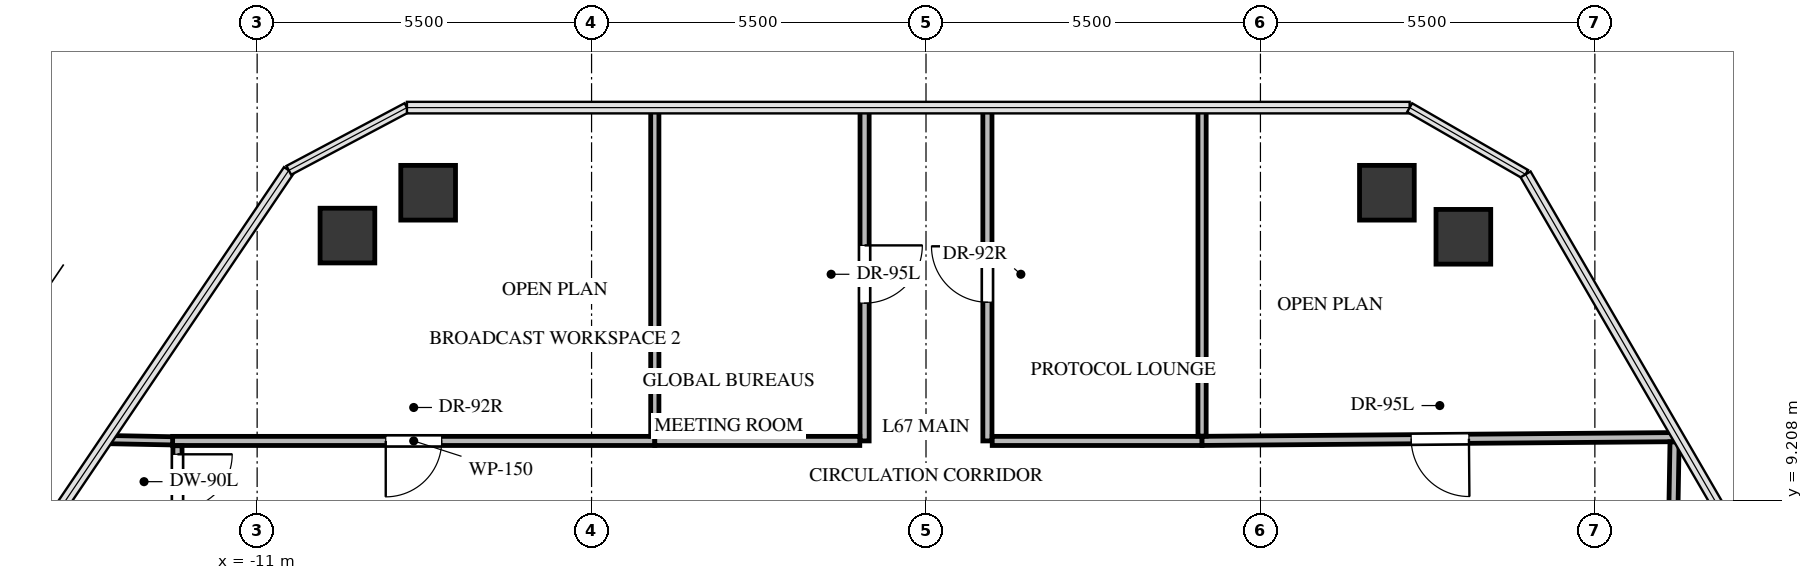
"""IFC4 building model, lengths in metres.
Left out: names, types, materials, properties, quantities, classifications, styles, units other than length and angle.
Written with IfcOpenShell. Run it as: python <this file> out.ifc"""

import sys

from ifc_helpers import new_model, si_unit, direction, frame, frame_2d, origin, origin_2d, place, context, subcontext, project, spatial, rectangle, extrude, source, transform, mapped, element, fill, save


model = new_model("IFC4")
c1 = context("Model", 3, precision=1e-05, world=origin(), true_north=direction((0.0, 1.0)))
c2 = subcontext(c1, "Body", "Model", "MODEL_VIEW")
j1 = project(units=[si_unit("LENGTHUNIT", "METRE"), si_unit("PLANEANGLEUNIT", "RADIAN")], contexts=[c1])
p1 = place(None, origin())
s1 = spatial("IfcSite", under=j1, at=p1, CompositionType="ELEMENT")
p2 = place(p1, origin())
s2 = spatial("IfcBuilding", under=s1, at=p2, CompositionType="ELEMENT")
p3 = place(p2, frame((0.0, 0.0, 241.4)))
s3 = spatial("IfcBuildingStorey", under=s2, at=p3, CompositionType="ELEMENT", Elevation=241.4)
m1 = source(origin(), c2, "Body", "SweptSolid", [
    extrude(rectangle(XDim=0.9, YDim=0.9, at=origin_2d()), origin(), (0.0, 0.0, 1.0), 3.3),
])
for number, where, z_axis, x_axis in (
    (1, (-9.515, 13.557, -0.24), (0.0, 0.0, 1.0), (1.0, 0.0, 0.0)),
    (2, (-8.188, 14.262, -0.24), (0.0, 0.0, 1.0), (1.0, 0.0, 0.0)),
    (3, (7.58, 14.262, -0.24), (0.0, 0.0, 1.0), (1.0, 0.0, 0.0)),
    (4, (8.837, 13.538, -0.24), (0.0, 0.0, 1.0), (1.0, 0.0, 0.0)),
):
    element("IfcColumn", number, at=place(p3, frame(where, z_axis=z_axis, x_axis=x_axis)), inside=s3, PredefinedType="COLUMN", context=c2, shape_type="MappedRepresentation", body=[
        mapped(m1, transform((0.0, 0.0, 0.0), x_axis=(1.0, 0.0, 0.0), y_axis=(0.0, 1.0, 0.0), z_axis=(0.0, 0.0, 1.0), scale=1.0)),
    ])
p4 = place(p3, frame((-4.46, 10.18, 0.0), z_axis=(0.0, 0.0, 1.0), x_axis=(-1.0, 0.0, 0.0)))
e5 = element("IfcWall", 5, at=p4, inside=s3, PredefinedType="PARTITIONING", context=c2, shape_type="SweptSolid", body=[
    extrude(rectangle(XDim=7.93, YDim=0.15, at=frame_2d((3.965, 0.0))), origin(), (0.0, 0.0, 1.0), 2.302),
])
p5 = place(p4, frame((3.505, 0.0, 0.0)))
e6 = element("IfcOpeningElement", 6, at=p5, cuts=e5, PredefinedType="OPENING", context=c2, shape_type="SweptSolid", body=[
    extrude(rectangle(XDim=0.92, YDim=2.1, at=frame_2d((0.46, 1.05))), frame((0.0, 0.085, 0.0), z_axis=(0.0, -1.0, 0.0), x_axis=(1.0, 0.0, 0.0)), (0.0, 0.0, 1.0), 0.17),
])
p6 = place(p3, frame((-1.01, 15.662, 0.0), z_axis=(0.0, 0.0, 1.0), x_axis=(0.0, -1.0, 0.0)))
e7 = element("IfcWall", 7, at=p6, inside=s3, PredefinedType="PARTITIONING", context=c2, shape_type="SweptSolid", body=[
    extrude(rectangle(XDim=5.482, YDim=0.15, at=frame_2d((2.741, 0.0))), origin(), (0.0, 0.0, 1.0), 2.399),
])
p7 = place(p6, frame((2.266, 0.0, 0.0)))
e8 = element("IfcOpeningElement", 8, at=p7, cuts=e7, PredefinedType="OPENING", context=c2, shape_type="SweptSolid", body=[
    extrude(rectangle(XDim=0.95, YDim=2.1, at=frame_2d((0.475, 1.05))), frame((0.0, 0.085, 0.0), z_axis=(0.0, -1.0, 0.0), x_axis=(1.0, 0.0, 0.0)), (0.0, 0.0, 1.0), 0.17),
])
p8 = place(p3, frame((-1.089, 10.18, 0.0), z_axis=(0.0, 0.0, 1.0), x_axis=(-1.0, 0.0, 0.0)))
e9 = element("IfcWall", 9, at=p8, inside=s3, PredefinedType="PARTITIONING", context=c2, shape_type="SweptSolid", body=[
    extrude(rectangle(XDim=3.371, YDim=0.15, at=frame_2d((1.686, 0.0))), origin(), (0.0, 0.0, 1.0), 3.045),
])
p9 = place(p3, frame((1.01, 10.18, 0.0), z_axis=(0.0, 0.0, 1.0), x_axis=(0.0, 1.0, 0.0)))
e10 = element("IfcWall", 10, at=p9, inside=s3, PredefinedType="PARTITIONING", context=c2, shape_type="SweptSolid", body=[
    extrude(rectangle(XDim=5.482, YDim=0.15, at=frame_2d((2.741, 0.0))), origin(), (0.0, 0.0, 1.0), 2.399),
])
p10 = place(p9, frame((2.281, 0.0, 0.0)))
e11 = element("IfcOpeningElement", 11, at=p10, cuts=e10, PredefinedType="OPENING", context=c2, shape_type="SweptSolid", body=[
    extrude(rectangle(XDim=0.92, YDim=2.1, at=frame_2d((0.46, 1.05))), frame((0.0, 0.085, 0.0), z_axis=(0.0, -1.0, 0.0), x_axis=(1.0, 0.0, 0.0)), (0.0, 0.0, 1.0), 0.17),
])
p11 = place(p3, frame((4.54, 10.18, 0.0), z_axis=(0.0, 0.0, 1.0), x_axis=(-1.0, 0.0, 0.0)))
e12 = element("IfcWall", 12, at=p11, inside=s3, PredefinedType="PARTITIONING", context=c2, shape_type="SweptSolid", body=[
    extrude(rectangle(XDim=3.451, YDim=0.15, at=frame_2d((1.726, 0.0))), origin(), (0.0, 0.0, 1.0), 3.045),
])
p12 = place(p3, frame((12.368, 10.243, 0.0), z_axis=(0.0, 0.0, 1.0), x_axis=(-0.999968379606, -0.007952344825, 0.0)))
e13 = element("IfcWall", 13, at=p12, inside=s3, PredefinedType="PARTITIONING", context=c2, shape_type="SweptSolid", body=[
    extrude(rectangle(XDim=7.829, YDim=0.15, at=frame_2d((3.914, 0.0))), origin(), (0.0, 0.0, 1.0), 2.302),
])
p13 = place(p12, frame((3.439, 0.0, 0.0)))
e14 = element("IfcOpeningElement", 14, at=p13, cuts=e13, PredefinedType="OPENING", context=c2, shape_type="SweptSolid", body=[
    extrude(rectangle(XDim=0.95, YDim=2.1, at=frame_2d((0.475, 1.05))), frame((0.0, 0.085, 0.0), z_axis=(0.0, -1.0, 0.0), x_axis=(1.0, 0.0, 0.0)), (0.0, 0.0, 1.0), 0.17),
])
p14 = place(p3, frame((-12.31, 10.101, 0.0), z_axis=(0.0, 0.0, 1.0), x_axis=(0.0, -1.0, 0.0)))
e15 = element("IfcWall", 15, at=p14, inside=s3, PredefinedType="PARTITIONING", context=c2, shape_type="SweptSolid", body=[
    extrude(rectangle(XDim=1.182, YDim=0.15, at=frame_2d((0.591, 0.0))), origin(), (0.0, 0.0, 1.0), 2.399),
])
p15 = place(p14, frame((0.141, 0.0, 0.0)))
e16 = element("IfcOpeningElement", 16, at=p15, cuts=e15, PredefinedType="OPENING", context=c2, shape_type="SweptSolid", body=[
    extrude(rectangle(XDim=0.9, YDim=2.05, at=frame_2d((0.45, 1.025))), frame((0.0, 0.085, 0.0), z_axis=(0.0, -1.0, 0.0), x_axis=(1.0, 0.0, 0.0)), (0.0, 0.0, 1.0), 0.17),
])
p16 = place(p3, frame((12.181, 2.49, 0.0), z_axis=(0.0, 0.0, 1.0), x_axis=(0.016828669653, 0.999858387912, 0.0)))
e17 = element("IfcWall", 17, at=p16, inside=s3, PredefinedType="PARTITIONING", context=c2, shape_type="SweptSolid", body=[
    extrude(rectangle(XDim=7.674, YDim=0.15, at=frame_2d((3.837, 0.0))), origin(), (0.0, 0.0, 1.0), 2.399),
])
p17 = place(p16, frame((3.362, 0.0, 0.0)))
e18 = element("IfcOpeningElement", 18, at=p17, cuts=e17, PredefinedType="OPENING", context=c2, shape_type="SweptSolid", body=[
    extrude(rectangle(XDim=0.95, YDim=2.1, at=frame_2d((0.475, 1.05))), frame((0.0, 0.085, 0.0), z_axis=(0.0, -1.0, 0.0), x_axis=(1.0, 0.0, 0.0)), (0.0, 0.0, 1.0), 0.17),
])
p18 = place(p3, frame((-4.46, 15.662, 0.0), z_axis=(0.0, 0.0, 1.0), x_axis=(0.0, -1.0, 0.0)))
e19 = element("IfcWall", 19, at=p18, inside=s3, PredefinedType="PARTITIONING", context=c2, shape_type="SweptSolid", body=[
    extrude(rectangle(XDim=5.403, YDim=0.135, at=frame_2d((2.702, 0.0))), origin(), (0.0, 0.0, 1.0), 2.399),
])
p19 = place(p3, frame((-12.39, 10.181, 0.0), z_axis=(0.0, 0.0, 1.0), x_axis=(-0.999812128272, 0.019383192748, 0.0)))
e20 = element("IfcWall", 20, at=p19, inside=s3, PredefinedType="PARTITIONING", context=c2, shape_type="SweptSolid", body=[
    extrude(rectangle(XDim=1.083, YDim=0.135, at=frame_2d((0.542, 0.0))), origin(), (0.0, 0.0, 1.0), 3.045),
])
p20 = place(p3, frame((4.54, 15.662, 0.0), z_axis=(0.0, 0.0, 1.0), x_axis=(0.0, -1.0, 0.0)))
e21 = element("IfcWall", 21, at=p20, inside=s3, PredefinedType="PARTITIONING", context=c2, shape_type="SweptSolid", body=[
    extrude(rectangle(XDim=5.403, YDim=0.135, at=frame_2d((2.701, 0.0))), origin(), (0.0, 0.0, 1.0), 2.399),
])
m2 = source(origin(), c2, "Body", "SweptSolid", [
    extrude(rectangle(XDim=0.92, YDim=2.1, at=frame_2d((0.46, 1.05))), frame((0.0, 0.025, 0.0), z_axis=(0.0, -1.0, 0.0), x_axis=(1.0, 0.0, 0.0)), (0.0, 0.0, 1.0), 0.05),
])
p21 = place(p5, origin())
e22 = element("IfcDoor", 22, at=p21, inside=s3, OperationType="SINGLE_SWING_RIGHT", PredefinedType="DOOR", context=c2, shape_type="MappedRepresentation", body=[
    mapped(m2, transform((0.0, 0.0, 0.0), x_axis=(1.0, 0.0, 0.0), y_axis=(0.0, 1.0, 0.0), z_axis=(0.0, 0.0, 1.0), scale=1.0)),
])
fill(e6, e22)
m3 = source(origin(), c2, "Body", "SweptSolid", [
    extrude(rectangle(XDim=0.95, YDim=2.1, at=frame_2d((0.475, 1.05))), frame((0.0, 0.025, 0.0), z_axis=(0.0, -1.0, 0.0), x_axis=(1.0, 0.0, 0.0)), (0.0, 0.0, 1.0), 0.05),
])
p22 = place(p7, origin())
e23 = element("IfcDoor", 23, at=p22, inside=s3, OperationType="SINGLE_SWING_LEFT", PredefinedType="DOOR", context=c2, shape_type="MappedRepresentation", body=[
    mapped(m3, transform((0.0, 0.0, 0.0), x_axis=(1.0, 0.0, 0.0), y_axis=(0.0, 1.0, 0.0), z_axis=(0.0, 0.0, 1.0), scale=1.0)),
])
fill(e8, e23)
p23 = place(p10, origin())
e24 = element("IfcDoor", 24, at=p23, inside=s3, OperationType="SINGLE_SWING_RIGHT", PredefinedType="DOOR", context=c2, shape_type="MappedRepresentation", body=[
    mapped(m2, transform((0.0, 0.0, 0.0), x_axis=(1.0, 0.0, 0.0), y_axis=(0.0, 1.0, 0.0), z_axis=(0.0, 0.0, 1.0), scale=1.0)),
])
fill(e11, e24)
p24 = place(p13, origin())
e25 = element("IfcDoor", 25, at=p24, inside=s3, OperationType="SINGLE_SWING_LEFT", PredefinedType="DOOR", context=c2, shape_type="MappedRepresentation", body=[
    mapped(m3, transform((0.0, 0.0, 0.0), x_axis=(1.0, 0.0, 0.0), y_axis=(0.0, 1.0, 0.0), z_axis=(0.0, 0.0, 1.0), scale=1.0)),
])
fill(e14, e25)
m4 = source(origin(), c2, "Body", "SweptSolid", [
    extrude(rectangle(XDim=0.9, YDim=2.05, at=frame_2d((0.45, 1.025))), frame((0.0, 0.025, 0.0), z_axis=(0.0, -1.0, 0.0), x_axis=(1.0, 0.0, 0.0)), (0.0, 0.0, 1.0), 0.05),
])
p25 = place(p15, origin())
e26 = element("IfcDoor", 26, at=p25, inside=s3, OperationType="SINGLE_SWING_LEFT", PredefinedType="DOOR", context=c2, shape_type="MappedRepresentation", body=[
    mapped(m4, transform((0.0, 0.0, 0.0), x_axis=(1.0, 0.0, 0.0), y_axis=(0.0, 1.0, 0.0), z_axis=(0.0, 0.0, 1.0), scale=1.0)),
])
fill(e16, e26)
save(model, sys.argv[1])
